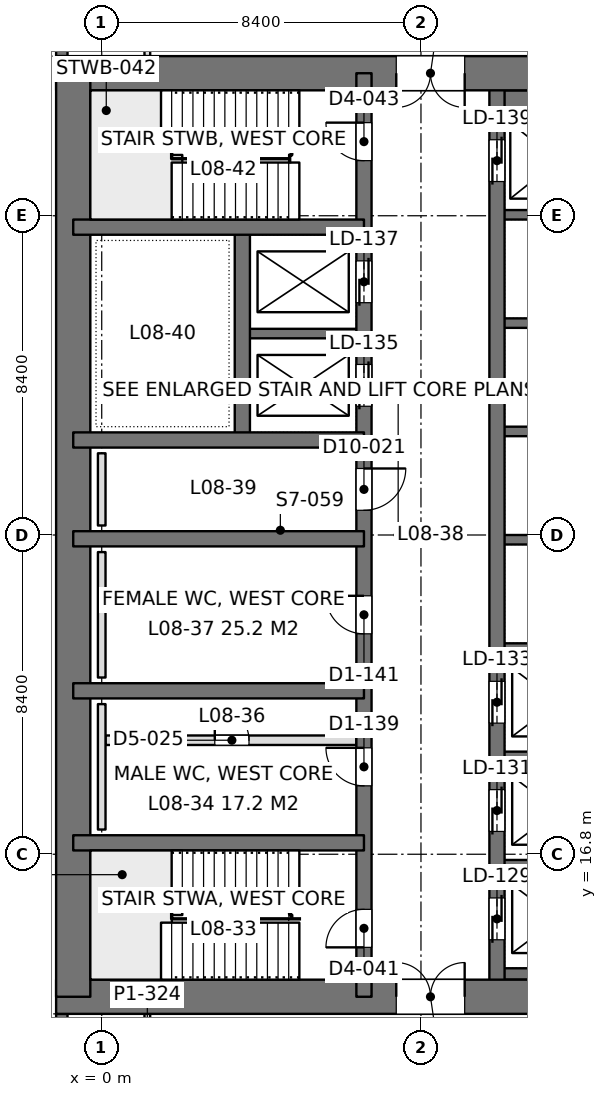
"""IFC4 building model, lengths in metres.
Left out: names, types, materials, properties, quantities, classifications, styles, units other than length and angle.
Written with IfcOpenShell. Run it as: python <this file> out.ifc"""

import sys

from ifc_helpers import new_model, si_unit, direction, frame, frame_2d, origin, place, context, subcontext, project, spatial, rectangle, extrude, element, fill, save


model = new_model("IFC4")
c1 = context("Model", 3, precision=1e-05, world=origin(), true_north=direction((0.0, 1.0)))
c2 = subcontext(c1, "Body", "Model", "MODEL_VIEW")
j1 = project(units=[si_unit("LENGTHUNIT", "METRE"), si_unit("PLANEANGLEUNIT", "RADIAN")], contexts=[c1])
p1 = place(None, origin())
s1 = spatial("IfcSite", under=j1, at=p1, CompositionType="ELEMENT")
p2 = place(p1, origin())
s2 = spatial("IfcBuilding", under=s1, at=p2, CompositionType="ELEMENT")
p3 = place(p2, frame((0.0, 0.0, 36.9)))
s3 = spatial("IfcBuildingStorey", under=s2, at=p3, CompositionType="ELEMENT", Elevation=36.9)
p4 = place(p3, frame((-1.2, 13.05, 0.0), z_axis=(0.0, 0.0, 1.0), x_axis=(1.0, 0.0, 0.0)))
e1 = element("IfcWall", 1, at=p4, inside=s3, PredefinedType="SHEAR", context=c2, shape_type="SweptSolid", body=[
    extrude(rectangle(XDim=18.0, YDim=0.9, at=frame_2d((9.0, 0.0))), origin(), (0.0, 0.0, 1.0), 4.5),
])
p5 = place(p4, frame((8.95, 0.0, 0.0)))
e2 = element("IfcOpeningElement", 2, at=p5, cuts=e1, PredefinedType="OPENING", context=c2, shape_type="SweptSolid", body=[
    extrude(rectangle(XDim=1.8, YDim=2.4, at=frame_2d((0.9, 1.2))), frame((0.0, 0.46, 0.0), z_axis=(0.0, -1.0, 0.0), x_axis=(1.0, 0.0, 0.0)), (0.0, 0.0, 1.0), 0.92),
])
p6 = place(p3, frame((-1.2, 37.35, 0.0), z_axis=(0.0, 0.0, 1.0), x_axis=(1.0, 0.0, 0.0)))
e3 = element("IfcWall", 3, at=p6, inside=s3, PredefinedType="SHEAR", context=c2, shape_type="SweptSolid", body=[
    extrude(rectangle(XDim=18.0, YDim=0.9, at=frame_2d((9.0, 0.0))), origin(), (0.0, 0.0, 1.0), 4.5),
])
p7 = place(p6, frame((8.95, 0.0, 0.0)))
e4 = element("IfcOpeningElement", 4, at=p7, cuts=e3, PredefinedType="OPENING", context=c2, shape_type="SweptSolid", body=[
    extrude(rectangle(XDim=1.8, YDim=2.4, at=frame_2d((0.9, 1.2))), frame((0.0, 0.46, 0.0), z_axis=(0.0, -1.0, 0.0), x_axis=(1.0, 0.0, 0.0)), (0.0, 0.0, 1.0), 0.92),
])
p8 = place(p3, frame((-0.75, 13.05, 0.0), z_axis=(0.0, 0.0, 1.0), x_axis=(0.0, 1.0, 0.0)))
e5 = element("IfcWall", 5, at=p8, inside=s3, PredefinedType="SHEAR", context=c2, shape_type="SweptSolid", body=[
    extrude(rectangle(XDim=24.3, YDim=0.9, at=frame_2d((12.15, 0.0))), origin(), (0.0, 0.0, 1.0), 4.5),
])
p9 = place(p3, frame((6.9, 13.05, 0.0), z_axis=(0.0, 0.0, 1.0), x_axis=(0.0, 1.0, 0.0)))
e6 = element("IfcWall", 6, at=p9, inside=s3, PredefinedType="SHEAR", context=c2, shape_type="SweptSolid", body=[
    extrude(rectangle(XDim=24.3, YDim=0.4, at=frame_2d((12.15, 0.0))), origin(), (0.0, 0.0, 1.0), 4.5),
])
p10 = place(p9, frame((1.3, 0.0, 0.0)))
e7 = element("IfcOpeningElement", 7, at=p10, cuts=e6, PredefinedType="OPENING", context=c2, shape_type="SweptSolid", body=[
    extrude(rectangle(XDim=1.0, YDim=2.2, at=frame_2d((0.5, 1.1))), frame((0.0, 0.21, 0.0), z_axis=(0.0, -1.0, 0.0), x_axis=(1.0, 0.0, 0.0)), (0.0, 0.0, 1.0), 0.42),
])
p11 = place(p9, frame((22.0, 0.0, 0.0)))
e8 = element("IfcOpeningElement", 8, at=p11, cuts=e6, PredefinedType="OPENING", context=c2, shape_type="SweptSolid", body=[
    extrude(rectangle(XDim=1.0, YDim=2.2, at=frame_2d((0.5, 1.1))), frame((0.0, 0.21, 0.0), z_axis=(0.0, -1.0, 0.0), x_axis=(1.0, 0.0, 0.0)), (0.0, 0.0, 1.0), 0.42),
])
p12 = place(p9, frame((5.55, 0.0, 0.0)))
e9 = element("IfcOpeningElement", 9, at=p12, cuts=e6, PredefinedType="OPENING", context=c2, shape_type="SweptSolid", body=[
    extrude(rectangle(XDim=1.0, YDim=2.2, at=frame_2d((0.5, 1.1))), frame((0.0, 0.21, 0.0), z_axis=(0.0, -1.0, 0.0), x_axis=(1.0, 0.0, 0.0)), (0.0, 0.0, 1.0), 0.42),
])
p13 = place(p9, frame((9.55, 0.0, 0.0)))
e10 = element("IfcOpeningElement", 10, at=p13, cuts=e6, PredefinedType="OPENING", context=c2, shape_type="SweptSolid", body=[
    extrude(rectangle(XDim=1.0, YDim=2.2, at=frame_2d((0.5, 1.1))), frame((0.0, 0.21, 0.0), z_axis=(0.0, -1.0, 0.0), x_axis=(1.0, 0.0, 0.0)), (0.0, 0.0, 1.0), 0.42),
])
p14 = place(p9, frame((12.8, 0.0, 0.0)))
e11 = element("IfcOpeningElement", 11, at=p14, cuts=e6, PredefinedType="OPENING", context=c2, shape_type="SweptSolid", body=[
    extrude(rectangle(XDim=1.1, YDim=2.2, at=frame_2d((0.55, 1.1))), frame((0.0, 0.21, 0.0), z_axis=(0.0, -1.0, 0.0), x_axis=(1.0, 0.0, 0.0)), (0.0, 0.0, 1.0), 0.42),
])
p15 = place(p9, frame((15.538, 0.0, 0.0)))
e12 = element("IfcOpeningElement", 12, at=p15, cuts=e6, PredefinedType="OPENING", context=c2, shape_type="SweptSolid", body=[
    extrude(rectangle(XDim=1.1, YDim=2.2, at=frame_2d((0.55, 1.1))), frame((0.0, 0.21, 0.0), z_axis=(0.0, -1.0, 0.0), x_axis=(1.0, 0.0, 0.0)), (0.0, 0.0, 1.0), 0.42),
])
p16 = place(p9, frame((18.262, 0.0, 0.0)))
e13 = element("IfcOpeningElement", 13, at=p16, cuts=e6, PredefinedType="OPENING", context=c2, shape_type="SweptSolid", body=[
    extrude(rectangle(XDim=1.1, YDim=2.2, at=frame_2d((0.55, 1.1))), frame((0.0, 0.21, 0.0), z_axis=(0.0, -1.0, 0.0), x_axis=(1.0, 0.0, 0.0)), (0.0, 0.0, 1.0), 0.42),
])
p17 = place(p3, frame((10.4, 13.05, 0.0), z_axis=(0.0, 0.0, 1.0), x_axis=(0.0, 1.0, 0.0)))
e14 = element("IfcWall", 14, at=p17, inside=s3, PredefinedType="SHEAR", context=c2, shape_type="SweptSolid", body=[
    extrude(rectangle(XDim=24.3, YDim=0.4, at=frame_2d((12.15, 0.0))), origin(), (0.0, 0.0, 1.0), 4.5),
])
p18 = place(p17, frame((1.5, 0.0, 0.0)))
e15 = element("IfcOpeningElement", 15, at=p18, cuts=e14, PredefinedType="OPENING", context=c2, shape_type="SweptSolid", body=[
    extrude(rectangle(XDim=1.1, YDim=2.2, at=frame_2d((0.55, 1.1))), frame((0.0, 0.21, 0.0), z_axis=(0.0, -1.0, 0.0), x_axis=(1.0, 0.0, 0.0)), (0.0, 0.0, 1.0), 0.42),
])
p19 = place(p17, frame((4.35, 0.0, 0.0)))
e16 = element("IfcOpeningElement", 16, at=p19, cuts=e14, PredefinedType="OPENING", context=c2, shape_type="SweptSolid", body=[
    extrude(rectangle(XDim=1.1, YDim=2.2, at=frame_2d((0.55, 1.1))), frame((0.0, 0.21, 0.0), z_axis=(0.0, -1.0, 0.0), x_axis=(1.0, 0.0, 0.0)), (0.0, 0.0, 1.0), 0.42),
])
p20 = place(p17, frame((7.2, 0.0, 0.0)))
e17 = element("IfcOpeningElement", 17, at=p20, cuts=e14, PredefinedType="OPENING", context=c2, shape_type="SweptSolid", body=[
    extrude(rectangle(XDim=1.1, YDim=2.2, at=frame_2d((0.55, 1.1))), frame((0.0, 0.21, 0.0), z_axis=(0.0, -1.0, 0.0), x_axis=(1.0, 0.0, 0.0)), (0.0, 0.0, 1.0), 0.42),
])
p21 = place(p17, frame((21.45, 0.0, 0.0)))
e18 = element("IfcOpeningElement", 18, at=p21, cuts=e14, PredefinedType="OPENING", context=c2, shape_type="SweptSolid", body=[
    extrude(rectangle(XDim=1.1, YDim=2.2, at=frame_2d((0.55, 1.1))), frame((0.0, 0.21, 0.0), z_axis=(0.0, -1.0, 0.0), x_axis=(1.0, 0.0, 0.0)), (0.0, 0.0, 1.0), 0.42),
])
for number, where, z_axis, x_axis in (
    (19, (-0.75, 17.1, 0.0), (0.0, 0.0, 1.0), (1.0, 0.0, 0.0)),
    (20, (-0.75, 21.1, 0.0), (0.0, 0.0, 1.0), (1.0, 0.0, 0.0)),
    (21, (-0.75, 25.1, 0.0), (0.0, 0.0, 1.0), (1.0, 0.0, 0.0)),
    (22, (-0.75, 27.7, 0.0), (0.0, 0.0, 1.0), (1.0, 0.0, 0.0)),
    (23, (-0.75, 33.3, 0.0), (0.0, 0.0, 1.0), (1.0, 0.0, 0.0)),
):
    element("IfcWall", number, at=place(p3, frame(where, z_axis=z_axis, x_axis=x_axis)), inside=s3, PredefinedType="SHEAR", context=c2, shape_type="SweptSolid", body=[
        extrude(rectangle(XDim=7.65, YDim=0.4, at=frame_2d((3.825, 0.0))), origin(), (0.0, 0.0, 1.0), 4.5),
    ])
p22 = place(p3, frame((3.7, 27.7, 0.0), z_axis=(0.0, 0.0, 1.0), x_axis=(0.0, 1.0, 0.0)))
e24 = element("IfcWall", 24, at=p22, inside=s3, PredefinedType="SHEAR", context=c2, shape_type="SweptSolid", body=[
    extrude(rectangle(XDim=5.6, YDim=0.4, at=frame_2d((2.8, 0.0))), origin(), (0.0, 0.0, 1.0), 4.5),
])
p23 = place(p3, frame((3.7, 30.5, 0.0), z_axis=(0.0, 0.0, 1.0), x_axis=(1.0, 0.0, 0.0)))
e25 = element("IfcWall", 25, at=p23, inside=s3, PredefinedType="SHEAR", context=c2, shape_type="SweptSolid", body=[
    extrude(rectangle(XDim=3.2, YDim=0.25, at=frame_2d((1.6, 0.0))), origin(), (0.0, 0.0, 1.0), 4.5),
])
p24 = place(p3, frame((10.4, 13.65, 0.0), z_axis=(0.0, 0.0, 1.0), x_axis=(1.0, 0.0, 0.0)))
e26 = element("IfcWall", 26, at=p24, inside=s3, PredefinedType="SHEAR", context=c2, shape_type="SweptSolid", body=[
    extrude(rectangle(XDim=3.2, YDim=0.3, at=frame_2d((1.6, 0.0))), origin(), (0.0, 0.0, 1.0), 4.5),
])
for number, where, z_axis, x_axis in (
    (27, (10.4, 16.525, 0.0), (0.0, 0.0, 1.0), (1.0, 0.0, 0.0)),
    (28, (10.4, 19.375, 0.0), (0.0, 0.0, 1.0), (1.0, 0.0, 0.0)),
    (29, (10.4, 22.225, 0.0), (0.0, 0.0, 1.0), (1.0, 0.0, 0.0)),
    (30, (10.4, 25.075, 0.0), (0.0, 0.0, 1.0), (1.0, 0.0, 0.0)),
    (31, (10.4, 27.925, 0.0), (0.0, 0.0, 1.0), (1.0, 0.0, 0.0)),
    (32, (10.4, 30.775, 0.0), (0.0, 0.0, 1.0), (1.0, 0.0, 0.0)),
    (33, (10.4, 33.625, 0.0), (0.0, 0.0, 1.0), (1.0, 0.0, 0.0)),
):
    element("IfcWall", number, at=place(p3, frame(where, z_axis=z_axis, x_axis=x_axis)), inside=s3, PredefinedType="SHEAR", context=c2, shape_type="SweptSolid", body=[
        extrude(rectangle(XDim=3.2, YDim=0.25, at=frame_2d((1.6, 0.0))), origin(), (0.0, 0.0, 1.0), 4.5),
    ])
p25 = place(p3, frame((10.4, 36.625, 0.0), z_axis=(0.0, 0.0, 1.0), x_axis=(1.0, 0.0, 0.0)))
e34 = element("IfcWall", 34, at=p25, inside=s3, PredefinedType="SHEAR", context=c2, shape_type="SweptSolid", body=[
    extrude(rectangle(XDim=3.2, YDim=0.55, at=frame_2d((1.6, 0.0))), origin(), (0.0, 0.0, 1.0), 4.5),
])
p26 = place(p3, frame((-1.05, 8.4, 0.0), z_axis=(0.0, 0.0, 1.0), x_axis=(0.0, 1.0, 0.0)))
e35 = element("IfcWall", 35, at=p26, inside=s3, PredefinedType="SOLIDWALL", context=c2, shape_type="SweptSolid", body=[
    extrude(rectangle(XDim=4.2, YDim=0.3, at=frame_2d((2.1, 0.0))), origin(), (0.0, 0.0, 1.0), 4.34),
])
p27 = place(p26, frame((0.9, 0.0, 0.9)))
e36 = element("IfcOpeningElement", 36, at=p27, cuts=e35, PredefinedType="OPENING", context=c2, shape_type="SweptSolid", body=[
    extrude(rectangle(XDim=2.4, YDim=1.9, at=frame_2d((1.2, 0.95))), frame((0.0, 0.16, 0.0), z_axis=(0.0, -1.0, 0.0), x_axis=(1.0, 0.0, 0.0)), (0.0, 0.0, 1.0), 0.32),
])
p28 = place(p3, frame((-1.05, 37.8, 0.0), z_axis=(0.0, 0.0, 1.0), x_axis=(0.0, 1.0, 0.0)))
e37 = element("IfcWall", 37, at=p28, inside=s3, PredefinedType="SOLIDWALL", context=c2, shape_type="SweptSolid", body=[
    extrude(rectangle(XDim=4.2, YDim=0.3, at=frame_2d((2.1, 0.0))), origin(), (0.0, 0.0, 1.0), 4.34),
])
p29 = place(p28, frame((0.9, 0.0, 0.9)))
e38 = element("IfcOpeningElement", 38, at=p29, cuts=e37, PredefinedType="OPENING", context=c2, shape_type="SweptSolid", body=[
    extrude(rectangle(XDim=2.4, YDim=1.9, at=frame_2d((1.2, 0.95))), frame((0.0, 0.16, 0.0), z_axis=(0.0, -1.0, 0.0), x_axis=(1.0, 0.0, 0.0)), (0.0, 0.0, 1.0), 0.32),
])
p30 = place(p3, frame((1.2, 10.4, 0.0), z_axis=(0.0, 0.0, 1.0), x_axis=(0.0, 1.0, 0.0)))
e39 = element("IfcWall", 39, at=p30, inside=s3, PredefinedType="PARTITIONING", context=c2, shape_type="SweptSolid", body=[
    extrude(rectangle(XDim=2.202, YDim=0.15, at=frame_2d((1.101, 0.0))), origin(), (0.0, 0.0, 1.0), 4.34),
])
p31 = place(p3, frame((1.2, 37.8, 0.0), z_axis=(0.0, 0.0, 1.0), x_axis=(0.0, 1.0, 0.0)))
e40 = element("IfcWall", 40, at=p31, inside=s3, PredefinedType="PARTITIONING", context=c2, shape_type="SweptSolid", body=[
    extrude(rectangle(XDim=2.2, YDim=0.15, at=frame_2d((1.1, 0.0))), origin(), (0.0, 0.0, 1.0), 4.34),
])
p32 = place(p3, frame((0.1, 19.8, 0.0), z_axis=(0.0, 0.0, 1.0), x_axis=(1.0, 0.0, 0.0)))
e41 = element("IfcWall", 41, at=p32, inside=s3, PredefinedType="PARTITIONING", context=c2, shape_type="SweptSolid", body=[
    extrude(rectangle(XDim=6.6, YDim=0.25, at=frame_2d((3.3, 0.0))), origin(), (0.0, 0.0, 1.0), 4.3),
])
p33 = place(p32, frame((2.875, 0.0, 0.0)))
e42 = element("IfcOpeningElement", 42, at=p33, cuts=e41, PredefinedType="OPENING", context=c2, shape_type="SweptSolid", body=[
    extrude(rectangle(XDim=0.9, YDim=2.2, at=frame_2d((0.45, 1.1))), frame((0.0, 0.135, 0.0), z_axis=(0.0, -1.0, 0.0), x_axis=(1.0, 0.0, 0.0)), (0.0, 0.0, 1.0), 0.27),
])
for number, where, z_axis, x_axis in (
    (43, (0.0, 17.45, 0.0), (0.0, 0.0, 1.0), (0.0, 1.0, 0.0)),
    (44, (0.0, 21.45, 0.0), (0.0, 0.0, 1.0), (0.0, 1.0, 0.0)),
):
    element("IfcWall", number, at=place(p3, frame(where, z_axis=z_axis, x_axis=x_axis)), inside=s3, PredefinedType="PLUMBINGWALL", context=c2, shape_type="SweptSolid", body=[
        extrude(rectangle(XDim=3.3, YDim=0.2, at=frame_2d((1.65, 0.0))), origin(), (0.0, 0.0, 1.0), 1.2),
    ])
p34 = place(p3, frame((0.0, 25.45, 0.0), z_axis=(0.0, 0.0, 1.0), x_axis=(0.0, 1.0, 0.0)))
e45 = element("IfcWall", 45, at=p34, inside=s3, PredefinedType="PLUMBINGWALL", context=c2, shape_type="SweptSolid", body=[
    extrude(rectangle(XDim=1.9, YDim=0.2, at=frame_2d((0.95, 0.0))), origin(), (0.0, 0.0, 1.0), 1.2),
])
p35 = place(p5, origin())
e46 = element("IfcDoor", 46, at=p35, inside=s3, OperationType="DOUBLE_DOOR_SINGLE_SWING", PredefinedType="DOOR", context=c2, shape_type="SweptSolid", body=[
    extrude(rectangle(XDim=1.8, YDim=2.4, at=frame_2d((0.9, 1.2))), frame((0.0, 0.025, 0.0), z_axis=(0.0, -1.0, 0.0), x_axis=(1.0, 0.0, 0.0)), (0.0, 0.0, 1.0), 0.05),
])
fill(e2, e46)
p36 = place(p7, frame((1.8, 0.0, 0.0), z_axis=(0.0, 0.0, 1.0), x_axis=(-1.0, 0.0, 0.0)))
e47 = element("IfcDoor", 47, at=p36, inside=s3, OperationType="DOUBLE_DOOR_SINGLE_SWING", PredefinedType="DOOR", context=c2, shape_type="SweptSolid", body=[
    extrude(rectangle(XDim=1.8, YDim=2.4, at=frame_2d((0.9, 1.2))), frame((0.0, 0.025, 0.0), z_axis=(0.0, -1.0, 0.0), x_axis=(1.0, 0.0, 0.0)), (0.0, 0.0, 1.0), 0.05),
])
fill(e4, e47)
p37 = place(p10, origin())
e48 = element("IfcDoor", 48, at=p37, inside=s3, OperationType="SINGLE_SWING_LEFT", PredefinedType="DOOR", context=c2, shape_type="SweptSolid", body=[
    extrude(rectangle(XDim=1.0, YDim=2.2, at=frame_2d((0.5, 1.1))), frame((0.0, 0.025, 0.0), z_axis=(0.0, -1.0, 0.0), x_axis=(1.0, 0.0, 0.0)), (0.0, 0.0, 1.0), 0.05),
])
fill(e7, e48)
p38 = place(p11, origin())
e49 = element("IfcDoor", 49, at=p38, inside=s3, OperationType="SINGLE_SWING_RIGHT", PredefinedType="DOOR", context=c2, shape_type="SweptSolid", body=[
    extrude(rectangle(XDim=1.0, YDim=2.2, at=frame_2d((0.5, 1.1))), frame((0.0, 0.025, 0.0), z_axis=(0.0, -1.0, 0.0), x_axis=(1.0, 0.0, 0.0)), (0.0, 0.0, 1.0), 0.05),
])
fill(e8, e49)
p39 = place(p12, origin())
e50 = element("IfcDoor", 50, at=p39, inside=s3, OperationType="SINGLE_SWING_RIGHT", PredefinedType="DOOR", context=c2, shape_type="SweptSolid", body=[
    extrude(rectangle(XDim=1.0, YDim=2.2, at=frame_2d((0.5, 1.1))), frame((0.0, 0.025, 0.0), z_axis=(0.0, -1.0, 0.0), x_axis=(1.0, 0.0, 0.0)), (0.0, 0.0, 1.0), 0.05),
])
fill(e9, e50)
p40 = place(p13, origin())
e51 = element("IfcDoor", 51, at=p40, inside=s3, OperationType="SINGLE_SWING_RIGHT", PredefinedType="DOOR", context=c2, shape_type="SweptSolid", body=[
    extrude(rectangle(XDim=1.0, YDim=2.2, at=frame_2d((0.5, 1.1))), frame((0.0, 0.025, 0.0), z_axis=(0.0, -1.0, 0.0), x_axis=(1.0, 0.0, 0.0)), (0.0, 0.0, 1.0), 0.05),
])
fill(e10, e51)
p41 = place(p14, frame((1.1, 0.0, 0.0), z_axis=(0.0, 0.0, 1.0), x_axis=(-1.0, 0.0, 0.0)))
e52 = element("IfcDoor", 52, at=p41, inside=s3, OperationType="SINGLE_SWING_LEFT", PredefinedType="DOOR", context=c2, shape_type="SweptSolid", body=[
    extrude(rectangle(XDim=1.1, YDim=2.2, at=frame_2d((0.55, 1.1))), frame((0.0, 0.025, 0.0), z_axis=(0.0, -1.0, 0.0), x_axis=(1.0, 0.0, 0.0)), (0.0, 0.0, 1.0), 0.05),
])
fill(e11, e52)
p42 = place(p18, origin())
e53 = element("IfcDoor", 53, at=p42, inside=s3, OperationType="DOUBLE_DOOR_SLIDING", PredefinedType="DOOR", context=c2, shape_type="SweptSolid", body=[
    extrude(rectangle(XDim=1.1, YDim=2.2, at=frame_2d((0.55, 1.1))), frame((0.0, 0.025, 0.0), z_axis=(0.0, -1.0, 0.0), x_axis=(1.0, 0.0, 0.0)), (0.0, 0.0, 1.0), 0.05),
])
fill(e15, e53)
p43 = place(p19, origin())
e54 = element("IfcDoor", 54, at=p43, inside=s3, OperationType="DOUBLE_DOOR_SLIDING", PredefinedType="DOOR", context=c2, shape_type="SweptSolid", body=[
    extrude(rectangle(XDim=1.1, YDim=2.2, at=frame_2d((0.55, 1.1))), frame((0.0, 0.025, 0.0), z_axis=(0.0, -1.0, 0.0), x_axis=(1.0, 0.0, 0.0)), (0.0, 0.0, 1.0), 0.05),
])
fill(e16, e54)
p44 = place(p20, origin())
e55 = element("IfcDoor", 55, at=p44, inside=s3, OperationType="DOUBLE_DOOR_SLIDING", PredefinedType="DOOR", context=c2, shape_type="SweptSolid", body=[
    extrude(rectangle(XDim=1.1, YDim=2.2, at=frame_2d((0.55, 1.1))), frame((0.0, 0.025, 0.0), z_axis=(0.0, -1.0, 0.0), x_axis=(1.0, 0.0, 0.0)), (0.0, 0.0, 1.0), 0.05),
])
fill(e17, e55)
p45 = place(p21, origin())
e56 = element("IfcDoor", 56, at=p45, inside=s3, OperationType="DOUBLE_DOOR_SLIDING", PredefinedType="DOOR", context=c2, shape_type="SweptSolid", body=[
    extrude(rectangle(XDim=1.1, YDim=2.2, at=frame_2d((0.55, 1.1))), frame((0.0, 0.025, 0.0), z_axis=(0.0, -1.0, 0.0), x_axis=(1.0, 0.0, 0.0)), (0.0, 0.0, 1.0), 0.05),
])
fill(e18, e56)
p46 = place(p15, origin())
e57 = element("IfcDoor", 57, at=p46, inside=s3, OperationType="DOUBLE_DOOR_SLIDING", PredefinedType="DOOR", context=c2, shape_type="SweptSolid", body=[
    extrude(rectangle(XDim=1.1, YDim=2.2, at=frame_2d((0.55, 1.1))), frame((0.0, 0.025, 0.0), z_axis=(0.0, -1.0, 0.0), x_axis=(1.0, 0.0, 0.0)), (0.0, 0.0, 1.0), 0.05),
])
fill(e12, e57)
p47 = place(p16, origin())
e58 = element("IfcDoor", 58, at=p47, inside=s3, OperationType="DOUBLE_DOOR_SLIDING", PredefinedType="DOOR", context=c2, shape_type="SweptSolid", body=[
    extrude(rectangle(XDim=1.1, YDim=2.2, at=frame_2d((0.55, 1.1))), frame((0.0, 0.025, 0.0), z_axis=(0.0, -1.0, 0.0), x_axis=(1.0, 0.0, 0.0)), (0.0, 0.0, 1.0), 0.05),
])
fill(e13, e58)
p48 = place(p33, origin())
e59 = element("IfcDoor", 59, at=p48, inside=s3, OperationType="SINGLE_SWING_LEFT", PredefinedType="DOOR", context=c2, shape_type="SweptSolid", body=[
    extrude(rectangle(XDim=0.9, YDim=2.2, at=frame_2d((0.45, 1.1))), frame((0.0, 0.025, 0.0), z_axis=(0.0, -1.0, 0.0), x_axis=(1.0, 0.0, 0.0)), (0.0, 0.0, 1.0), 0.05),
])
fill(e42, e59)
save(model, sys.argv[1])
